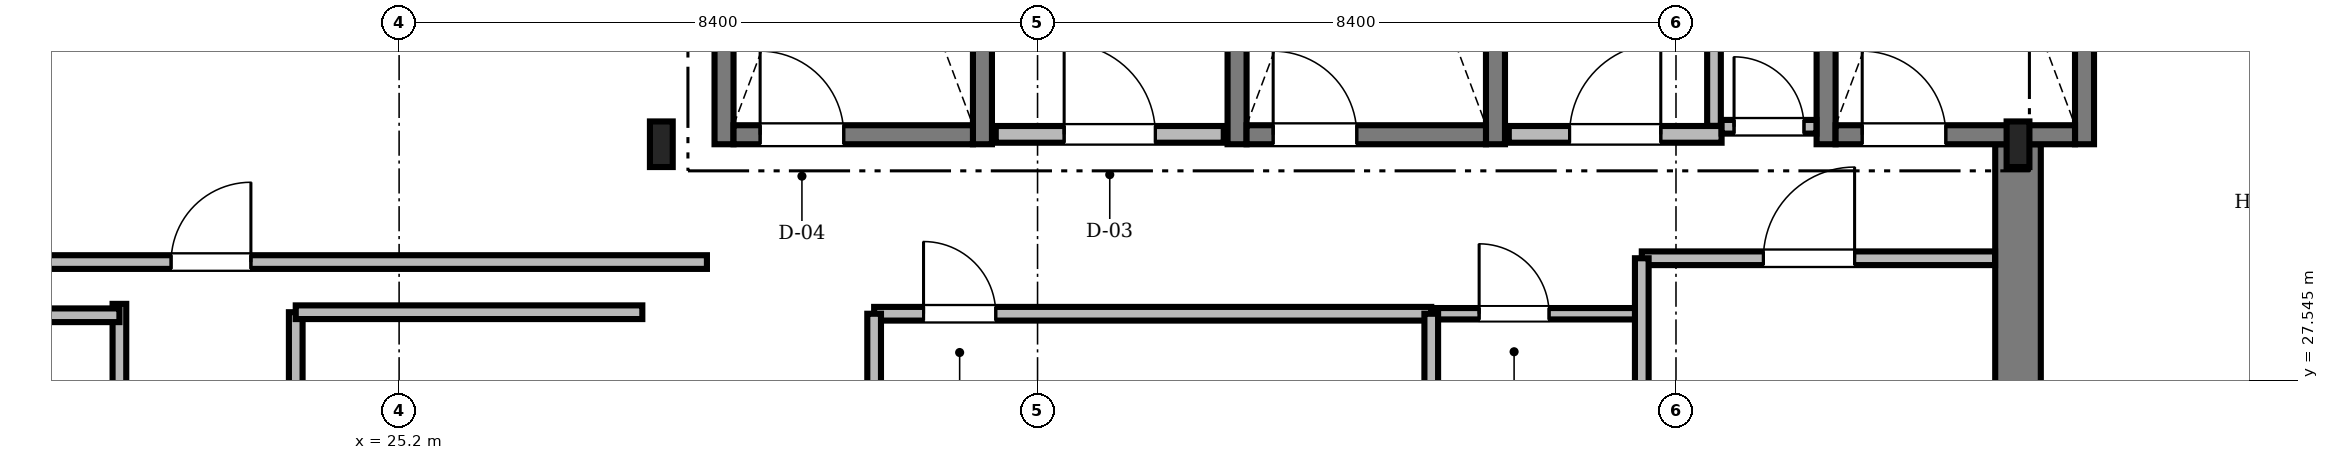
"""IFC4 building model, lengths in metres.
Left out: names, types, materials, properties, quantities, classifications, styles, units other than length and angle.
Written with IfcOpenShell. Run it as: python <this file> out.ifc"""

import sys

from ifc_helpers import new_model, si_unit, direction, frame, frame_2d, origin, origin_2d, place, context, subcontext, project, spatial, rectangle, i_section, extrude, source, transform, mapped, element, fill, save


model = new_model("IFC4")
c1 = context("Model", 3, precision=1e-05, world=origin(), true_north=direction((0.0, 1.0)))
c2 = subcontext(c1, "Body", "Model", "MODEL_VIEW")
j1 = project(units=[si_unit("LENGTHUNIT", "METRE"), si_unit("PLANEANGLEUNIT", "RADIAN")], contexts=[c1])
p1 = place(None, origin())
s1 = spatial("IfcSite", under=j1, at=p1, CompositionType="ELEMENT")
p2 = place(p1, origin())
s2 = spatial("IfcBuilding", under=s1, at=p2, CompositionType="ELEMENT")
p3 = place(p2, frame((0.0, 0.0, 270.35)))
s3 = spatial("IfcBuildingStorey", under=s2, at=p3, CompositionType="ELEMENT", Elevation=270.35)
m1 = source(origin(), c2, "Body", "SweptSolid", [
    extrude(rectangle(XDim=13.15, YDim=0.6, at=frame_2d((6.575, 0.0))), origin(), (0.0, 0.0, 1.0), 3.65),
])
p4 = place(p3, frame((46.5, 17.5, 0.0), z_axis=(0.0, 0.0, 1.0), x_axis=(0.0, 1.0, 0.0)))
e1 = element("IfcWall", 1, at=p4, inside=s3, PredefinedType="SHEAR", context=c2, shape_type="MappedRepresentation", body=[
    mapped(m1, transform((0.0, 0.0, 0.0), scale=1.0)),
])
m2 = source(origin(), c2, "Body", "SweptSolid", [
    extrude(i_section(OverallWidth=0.3, OverallDepth=0.6, WebThickness=0.015, FlangeThickness=0.03, FilletRadius=0.027, at=origin_2d()), origin(), (0.0, 0.0, 1.0), 3.65),
])
for number, where, z_axis, x_axis in (
    (2, (28.65, 30.65, 0.0), (0.0, 0.0, 1.0), (1.0, 0.0, 0.0)),
    (3, (46.5, 30.65, 0.0), (0.0, 0.0, 1.0), (1.0, 0.0, 0.0)),
):
    element("IfcColumn", number, at=place(p3, frame(where, z_axis=z_axis, x_axis=x_axis)), inside=s3, PredefinedType="COLUMN", context=c2, shape_type="MappedRepresentation", body=[
        mapped(m2, transform((0.0, 0.0, 0.0), scale=1.0)),
    ])
m3 = source(origin(), c2, "Body", "SweptSolid", [
    extrude(rectangle(XDim=9.35, YDim=0.25, at=frame_2d((4.675, 0.0))), origin(), (0.0, 0.0, 1.0), 3.75),
])
for number, where, z_axis, x_axis in (
    (4, (29.475, 30.65, 0.0), (0.0, 0.0, 1.0), (0.0, 1.0, 0.0)),
    (5, (32.875, 30.65, 0.0), (0.0, 0.0, 1.0), (0.0, 1.0, 0.0)),
):
    element("IfcWall", number, at=place(p3, frame(where, z_axis=z_axis, x_axis=x_axis)), inside=s3, PredefinedType="SOLIDWALL", context=c2, shape_type="MappedRepresentation", body=[
        mapped(m3, transform((0.0, 0.0, 0.0), scale=1.0)),
    ])
m4 = source(origin(), c2, "Body", "SweptSolid", [
    extrude(rectangle(XDim=3.15, YDim=0.25, at=frame_2d((1.575, 0.0))), origin(), (0.0, 0.0, 1.0), 3.75),
])
p5 = place(p3, frame((29.6, 30.775, 0.0), z_axis=(0.0, 0.0, 1.0), x_axis=(1.0, 0.0, 0.0)))
e6 = element("IfcWall", 6, at=p5, inside=s3, PredefinedType="SOLIDWALL", context=c2, shape_type="MappedRepresentation", body=[
    mapped(m4, transform((0.0, 0.0, 0.0), scale=1.0)),
])
m5 = source(origin(), c2, "Body", "SweptSolid", [
    extrude(rectangle(XDim=1.1, YDim=2.2, at=frame_2d((0.55, 1.1))), frame((0.0, 0.135, 0.0), z_axis=(0.0, -1.0, 0.0), x_axis=(1.0, 0.0, 0.0)), (0.0, 0.0, 1.0), 0.27),
])
p6 = place(p5, frame((0.35, 0.0, 0.0)))
e7 = element("IfcOpeningElement", 7, at=p6, cuts=e6, PredefinedType="OPENING", context=c2, shape_type="MappedRepresentation", body=[
    mapped(m5, transform((0.0, 0.0, 0.0), scale=1.0)),
])
for number, where, z_axis, x_axis in (
    (8, (36.225, 30.65, 0.0), (0.0, 0.0, 1.0), (0.0, 1.0, 0.0)),
    (9, (39.625, 30.65, 0.0), (0.0, 0.0, 1.0), (0.0, 1.0, 0.0)),
):
    element("IfcWall", number, at=place(p3, frame(where, z_axis=z_axis, x_axis=x_axis)), inside=s3, PredefinedType="SOLIDWALL", context=c2, shape_type="MappedRepresentation", body=[
        mapped(m3, transform((0.0, 0.0, 0.0), scale=1.0)),
    ])
p7 = place(p3, frame((36.35, 30.775, 0.0), z_axis=(0.0, 0.0, 1.0), x_axis=(1.0, 0.0, 0.0)))
e10 = element("IfcWall", 10, at=p7, inside=s3, PredefinedType="SOLIDWALL", context=c2, shape_type="MappedRepresentation", body=[
    mapped(m4, transform((0.0, 0.0, 0.0), scale=1.0)),
])
p8 = place(p7, frame((0.35, 0.0, 0.0)))
e11 = element("IfcOpeningElement", 11, at=p8, cuts=e10, PredefinedType="OPENING", context=c2, shape_type="MappedRepresentation", body=[
    mapped(m5, transform((0.0, 0.0, 0.0), scale=1.0)),
])
for number, where, z_axis, x_axis in (
    (12, (43.975, 30.65, 0.0), (0.0, 0.0, 1.0), (0.0, 1.0, 0.0)),
    (13, (47.375, 30.65, 0.0), (0.0, 0.0, 1.0), (0.0, 1.0, 0.0)),
):
    element("IfcWall", number, at=place(p3, frame(where, z_axis=z_axis, x_axis=x_axis)), inside=s3, PredefinedType="SOLIDWALL", context=c2, shape_type="MappedRepresentation", body=[
        mapped(m3, transform((0.0, 0.0, 0.0), scale=1.0)),
    ])
p9 = place(p3, frame((44.1, 30.775, 0.0), z_axis=(0.0, 0.0, 1.0), x_axis=(1.0, 0.0, 0.0)))
e14 = element("IfcWall", 14, at=p9, inside=s3, PredefinedType="SOLIDWALL", context=c2, shape_type="MappedRepresentation", body=[
    mapped(m4, transform((0.0, 0.0, 0.0), scale=1.0)),
])
p10 = place(p9, frame((0.35, 0.0, 0.0)))
e15 = element("IfcOpeningElement", 15, at=p10, cuts=e14, PredefinedType="OPENING", context=c2, shape_type="MappedRepresentation", body=[
    mapped(m5, transform((0.0, 0.0, 0.0), scale=1.0)),
])
m6 = source(origin(), c2, "Body", "SweptSolid", [
    extrude(rectangle(XDim=3.0, YDim=0.22, at=frame_2d((1.5, 0.0))), origin(), (0.0, 0.0, 1.0), 3.65),
])
p11 = place(p3, frame((33.05, 30.78, 0.0), z_axis=(0.0, 0.0, 1.0), x_axis=(1.0, 0.0, 0.0)))
e16 = element("IfcWall", 16, at=p11, inside=s3, PredefinedType="SOLIDWALL", context=c2, shape_type="MappedRepresentation", body=[
    mapped(m6, transform((0.0, 0.0, 0.0), scale=1.0)),
])
m7 = source(origin(), c2, "Body", "SweptSolid", [
    extrude(rectangle(XDim=1.2, YDim=2.2, at=frame_2d((0.6, 1.1))), frame((0.0, 0.12, 0.0), z_axis=(0.0, -1.0, 0.0), x_axis=(1.0, 0.0, 0.0)), (0.0, 0.0, 1.0), 0.24),
])
p12 = place(p11, frame((0.9, 0.0, 0.0)))
e17 = element("IfcOpeningElement", 17, at=p12, cuts=e16, PredefinedType="OPENING", context=c2, shape_type="MappedRepresentation", body=[
    mapped(m7, transform((0.0, 0.0, 0.0), scale=1.0)),
])
m8 = source(origin(), c2, "Body", "SweptSolid", [
    extrude(rectangle(XDim=2.8, YDim=0.22, at=frame_2d((1.4, 0.0))), origin(), (0.0, 0.0, 1.0), 3.65),
])
p13 = place(p3, frame((39.8, 30.78, 0.0), z_axis=(0.0, 0.0, 1.0), x_axis=(1.0, 0.0, 0.0)))
e18 = element("IfcWall", 18, at=p13, inside=s3, PredefinedType="SOLIDWALL", context=c2, shape_type="MappedRepresentation", body=[
    mapped(m8, transform((0.0, 0.0, 0.0), scale=1.0)),
])
p14 = place(p13, frame((0.8, 0.0, 0.0)))
e19 = element("IfcOpeningElement", 19, at=p14, cuts=e18, PredefinedType="OPENING", context=c2, shape_type="MappedRepresentation", body=[
    mapped(m7, transform((0.0, 0.0, 0.0), scale=1.0)),
])
m9 = source(origin(), c2, "Body", "SweptSolid", [
    extrude(rectangle(XDim=14.42, YDim=0.18, at=frame_2d((7.21, 0.0))), origin(), (0.0, 0.0, 1.0), 3.092),
])
p15 = place(p3, frame((21.52, 14.13, 0.0), z_axis=(0.0, 0.0, 1.0), x_axis=(0.0, 1.0, 0.0)))
e20 = element("IfcWall", 20, at=p15, inside=s3, PredefinedType="PARTITIONING", context=c2, shape_type="MappedRepresentation", body=[
    mapped(m9, transform((0.0, 0.0, 0.0), scale=1.0)),
])
m10 = source(origin(), c2, "Body", "SweptSolid", [
    extrude(rectangle(XDim=1.05, YDim=2.2, at=frame_2d((0.525, 1.1))), frame((0.0, 0.1, 0.0), z_axis=(0.0, -1.0, 0.0), x_axis=(1.0, 0.0, 0.0)), (0.0, 0.0, 1.0), 0.2),
])
p16 = place(p15, frame((3.048, 0.0, 0.0)))
e21 = element("IfcOpeningElement", 21, at=p16, cuts=e20, PredefinedType="OPENING", context=c2, shape_type="MappedRepresentation", body=[
    mapped(m10, transform((0.0, 0.0, 0.0), scale=1.0)),
])
p17 = place(p15, frame((10.183, 0.0, 0.0)))
e22 = element("IfcOpeningElement", 22, at=p17, cuts=e20, PredefinedType="OPENING", context=c2, shape_type="MappedRepresentation", body=[
    mapped(m10, transform((0.0, 0.0, 0.0), scale=1.0)),
])
m11 = source(origin(), c2, "Body", "SweptSolid", [
    extrude(rectangle(XDim=11.94, YDim=0.18, at=frame_2d((5.97, 0.0))), origin(), (0.0, 0.0, 1.0), 3.092),
])
p18 = place(p3, frame((23.84, 16.5, 0.0), z_axis=(0.0, 0.0, 1.0), x_axis=(0.0, 1.0, 0.0)))
e23 = element("IfcWall", 23, at=p18, inside=s3, PredefinedType="PARTITIONING", context=c2, shape_type="MappedRepresentation", body=[
    mapped(m11, transform((0.0, 0.0, 0.0), scale=1.0)),
])
p19 = place(p18, frame((4.5, 0.0, 0.0)))
e24 = element("IfcOpeningElement", 24, at=p19, cuts=e23, PredefinedType="OPENING", context=c2, shape_type="MappedRepresentation", body=[
    mapped(m10, transform((0.0, 0.0, 0.0), scale=1.0)),
])
m12 = source(origin(), c2, "Body", "SweptSolid", [
    extrude(rectangle(XDim=11.168, YDim=0.18, at=frame_2d((5.584, 0.0))), origin(), (0.0, 0.0, 1.0), 2.892),
])
p20 = place(p3, frame((18.082, 29.1, 0.0), z_axis=(0.0, 0.0, 1.0), x_axis=(1.0, 0.0, 0.0)))
e25 = element("IfcWall", 25, at=p20, inside=s3, PredefinedType="PARTITIONING", context=c2, shape_type="MappedRepresentation", body=[
    mapped(m12, transform((0.0, 0.0, 0.0), scale=1.0)),
])
p21 = place(p20, frame((4.118, 0.0, 0.0)))
e26 = element("IfcOpeningElement", 26, at=p21, cuts=e25, PredefinedType="OPENING", context=c2, shape_type="MappedRepresentation", body=[
    mapped(m10, transform((0.0, 0.0, 0.0), scale=1.0)),
])
m13 = source(origin(), c2, "Body", "SweptSolid", [
    extrude(rectangle(XDim=7.33, YDim=0.18, at=frame_2d((3.665, 0.0))), origin(), (0.0, 0.0, 1.0), 3.282),
])
p22 = place(p3, frame((31.45, 28.42, 0.0), z_axis=(0.0, 0.0, 1.0), x_axis=(1.0, 0.0, 0.0)))
e27 = element("IfcWall", 27, at=p22, inside=s3, PredefinedType="PARTITIONING", context=c2, shape_type="MappedRepresentation", body=[
    mapped(m13, transform((0.0, 0.0, 0.0), scale=1.0)),
])
m14 = source(origin(), c2, "Body", "SweptSolid", [
    extrude(rectangle(XDim=0.95, YDim=2.15, at=frame_2d((0.475, 1.075))), frame((0.0, 0.1, 0.0), z_axis=(0.0, -1.0, 0.0), x_axis=(1.0, 0.0, 0.0)), (0.0, 0.0, 1.0), 0.2),
])
p23 = place(p22, frame((0.65, 0.0, 0.0)))
e28 = element("IfcOpeningElement", 28, at=p23, cuts=e27, PredefinedType="OPENING", context=c2, shape_type="MappedRepresentation", body=[
    mapped(m14, transform((0.0, 0.0, 0.0), scale=1.0)),
])
m15 = source(origin(), c2, "Body", "SweptSolid", [
    extrude(rectangle(XDim=4.648, YDim=0.18, at=frame_2d((2.324, 0.0))), origin(), (0.0, 0.0, 1.0), 3.282),
])
p24 = place(p3, frame((41.55, 29.15, 0.0), z_axis=(0.0, 0.0, 1.0), x_axis=(1.0, 0.0, 0.0)))
e29 = element("IfcWall", 29, at=p24, inside=s3, PredefinedType="PARTITIONING", context=c2, shape_type="MappedRepresentation", body=[
    mapped(m15, transform((0.0, 0.0, 0.0), scale=1.0)),
])
m16 = source(origin(), c2, "Body", "SweptSolid", [
    extrude(rectangle(XDim=1.2, YDim=2.2, at=frame_2d((0.6, 1.1))), frame((0.0, 0.1, 0.0), z_axis=(0.0, -1.0, 0.0), x_axis=(1.0, 0.0, 0.0)), (0.0, 0.0, 1.0), 0.2),
])
p25 = place(p24, frame((1.6, 0.0, 0.0)))
e30 = element("IfcOpeningElement", 30, at=p25, cuts=e29, PredefinedType="OPENING", context=c2, shape_type="MappedRepresentation", body=[
    mapped(m16, transform((0.0, 0.0, 0.0), scale=1.0)),
])
m17 = source(origin(), c2, "Body", "SweptSolid", [
    extrude(rectangle(XDim=2.74, YDim=0.15, at=frame_2d((1.37, 0.0))), origin(), (0.0, 0.0, 1.0), 3.65),
])
p26 = place(p3, frame((38.78, 28.42, 0.0), z_axis=(0.0, 0.0, 1.0), x_axis=(1.0, 0.0, 0.0)))
e31 = element("IfcWall", 31, at=p26, inside=s3, PredefinedType="PARTITIONING", context=c2, shape_type="MappedRepresentation", body=[
    mapped(m17, transform((0.0, 0.0, 0.0), scale=1.0)),
])
m18 = source(origin(), c2, "Body", "SweptSolid", [
    extrude(rectangle(XDim=0.92, YDim=2.1, at=frame_2d((0.46, 1.05))), frame((0.0, 0.085, 0.0), z_axis=(0.0, -1.0, 0.0), x_axis=(1.0, 0.0, 0.0)), (0.0, 0.0, 1.0), 0.17),
])
p27 = place(p26, frame((0.63, 0.0, 0.0)))
e32 = element("IfcOpeningElement", 32, at=p27, cuts=e31, PredefinedType="OPENING", context=c2, shape_type="MappedRepresentation", body=[
    mapped(m18, transform((0.0, 0.0, 0.0), scale=1.0)),
])
m19 = source(origin(), c2, "Body", "SweptSolid", [
    extrude(rectangle(XDim=1.248, YDim=0.18, at=frame_2d((0.624, 0.0))), origin(), (0.0, 0.0, 1.0), 3.65),
])
p28 = place(p3, frame((42.6, 30.88, 0.0), z_axis=(0.0, 0.0, 1.0), x_axis=(1.0, 0.0, 0.0)))
e33 = element("IfcWall", 33, at=p28, inside=s3, PredefinedType="PARTITIONING", context=c2, shape_type="MappedRepresentation", body=[
    mapped(m19, transform((0.0, 0.0, 0.0), scale=1.0)),
])
m20 = source(origin(), c2, "Body", "SweptSolid", [
    extrude(rectangle(XDim=0.92, YDim=2.1, at=frame_2d((0.46, 1.05))), frame((0.0, 0.1, 0.0), z_axis=(0.0, -1.0, 0.0), x_axis=(1.0, 0.0, 0.0)), (0.0, 0.0, 1.0), 0.2),
])
p29 = place(p28, frame((0.164, 0.0, 0.0)))
e34 = element("IfcOpeningElement", 34, at=p29, cuts=e33, PredefinedType="OPENING", context=c2, shape_type="MappedRepresentation", body=[
    mapped(m20, transform((0.0, 0.0, 0.0), scale=1.0)),
])
m21 = source(origin(), c2, "Body", "SweptSolid", [
    extrude(rectangle(XDim=4.56, YDim=0.18, at=frame_2d((2.28, 0.0))), origin(), (0.0, 0.0, 1.0), 3.65),
])
p30 = place(p3, frame((23.84, 28.44, 0.0), z_axis=(0.0, 0.0, 1.0), x_axis=(1.0, 0.0, 0.0)))
e35 = element("IfcWall", 35, at=p30, inside=s3, PredefinedType="PARTITIONING", context=c2, shape_type="MappedRepresentation", body=[
    mapped(m21, transform((0.0, 0.0, 0.0), scale=1.0)),
])
m22 = source(origin(), c2, "Body", "SweptSolid", [
    extrude(rectangle(XDim=3.63, YDim=0.18, at=frame_2d((1.815, 0.0))), origin(), (0.0, 0.0, 1.0), 2.892),
])
p31 = place(p3, frame((17.89, 28.4, 0.0), z_axis=(0.0, 0.0, 1.0), x_axis=(1.0, 0.0, 0.0)))
e36 = element("IfcWall", 36, at=p31, inside=s3, PredefinedType="PARTITIONING", context=c2, shape_type="MappedRepresentation", body=[
    mapped(m22, transform((0.0, 0.0, 0.0), scale=1.0)),
])
m23 = source(origin(), c2, "Body", "SweptSolid", [
    extrude(rectangle(XDim=2.758, YDim=0.18, at=frame_2d((1.379, 0.0))), origin(), (0.0, 0.0, 1.0), 3.65),
])
p32 = place(p3, frame((42.5, 30.892, 0.0), z_axis=(0.0, 0.0, 1.0), x_axis=(0.0, 1.0, 0.0)))
e37 = element("IfcWall", 37, at=p32, inside=s3, PredefinedType="PARTITIONING", context=c2, shape_type="MappedRepresentation", body=[
    mapped(m23, transform((0.0, 0.0, 0.0), scale=1.0)),
])
m24 = source(origin(), c2, "Body", "SweptSolid", [
    extrude(rectangle(XDim=2.35, YDim=0.18, at=frame_2d((1.175, 0.0))), origin(), (0.0, 0.0, 1.0), 3.282),
])
p33 = place(p3, frame((41.55, 26.8, 0.0), z_axis=(0.0, 0.0, 1.0), x_axis=(0.0, 1.0, 0.0)))
e38 = element("IfcWall", 38, at=p33, inside=s3, PredefinedType="PARTITIONING", context=c2, shape_type="MappedRepresentation", body=[
    mapped(m24, transform((0.0, 0.0, 0.0), scale=1.0)),
])
m25 = source(origin(), c2, "Body", "SweptSolid", [
    extrude(rectangle(XDim=1.6, YDim=0.18, at=frame_2d((0.8, 0.0))), origin(), (0.0, 0.0, 1.0), 3.192),
])
for number, where, z_axis, x_axis in (
    (39, (31.45, 26.82, 0.0), (0.0, 0.0, 1.0), (0.0, 1.0, 0.0)),
    (40, (38.78, 26.82, 0.0), (0.0, 0.0, 1.0), (0.0, 1.0, 0.0)),
):
    element("IfcWall", number, at=place(p3, frame(where, z_axis=z_axis, x_axis=x_axis)), inside=s3, PredefinedType="PARTITIONING", context=c2, shape_type="MappedRepresentation", body=[
        mapped(m25, transform((0.0, 0.0, 0.0), scale=1.0)),
    ])
m26 = source(origin(), c2, "Body", "SweptSolid", [
    extrude(rectangle(XDim=1.1, YDim=2.2, at=frame_2d((0.55, 1.1))), frame((0.0, 0.025, 0.0), z_axis=(0.0, -1.0, 0.0), x_axis=(1.0, 0.0, 0.0)), (0.0, 0.0, 1.0), 0.05),
])
p34 = place(p6, origin())
e41 = element("IfcDoor", 41, at=p34, inside=s3, OperationType="SINGLE_SWING_LEFT", PredefinedType="DOOR", context=c2, shape_type="MappedRepresentation", body=[
    mapped(m26, transform((0.0, 0.0, 0.0), scale=1.0)),
])
fill(e7, e41)
p35 = place(p8, origin())
e42 = element("IfcDoor", 42, at=p35, inside=s3, OperationType="SINGLE_SWING_LEFT", PredefinedType="DOOR", context=c2, shape_type="MappedRepresentation", body=[
    mapped(m26, transform((0.0, 0.0, 0.0), scale=1.0)),
])
fill(e11, e42)
p36 = place(p10, origin())
e43 = element("IfcDoor", 43, at=p36, inside=s3, OperationType="SINGLE_SWING_LEFT", PredefinedType="DOOR", context=c2, shape_type="MappedRepresentation", body=[
    mapped(m26, transform((0.0, 0.0, 0.0), scale=1.0)),
])
fill(e15, e43)
m27 = source(origin(), c2, "Body", "SweptSolid", [
    extrude(rectangle(XDim=1.2, YDim=2.2, at=frame_2d((0.6, 1.1))), frame((0.0, 0.025, 0.0), z_axis=(0.0, -1.0, 0.0), x_axis=(1.0, 0.0, 0.0)), (0.0, 0.0, 1.0), 0.05),
])
p37 = place(p12, origin())
e44 = element("IfcDoor", 44, at=p37, inside=s3, OperationType="SINGLE_SWING_LEFT", PredefinedType="DOOR", context=c2, shape_type="MappedRepresentation", body=[
    mapped(m27, transform((0.0, 0.0, 0.0), scale=1.0)),
])
fill(e17, e44)
p38 = place(p14, origin())
e45 = element("IfcDoor", 45, at=p38, inside=s3, OperationType="SINGLE_SWING_RIGHT", PredefinedType="DOOR", context=c2, shape_type="MappedRepresentation", body=[
    mapped(m27, transform((0.0, 0.0, 0.0), scale=1.0)),
])
fill(e19, e45)
m28 = source(origin(), c2, "Body", "SweptSolid", [
    extrude(rectangle(XDim=1.05, YDim=2.2, at=frame_2d((0.525, 1.1))), frame((0.0, 0.025, 0.0), z_axis=(0.0, -1.0, 0.0), x_axis=(1.0, 0.0, 0.0)), (0.0, 0.0, 1.0), 0.05),
])
p39 = place(p21, origin())
e46 = element("IfcDoor", 46, at=p39, inside=s3, OperationType="SINGLE_SWING_RIGHT", PredefinedType="DOOR", context=c2, shape_type="MappedRepresentation", body=[
    mapped(m28, transform((0.0, 0.0, 0.0), scale=1.0)),
])
fill(e26, e46)
m29 = source(origin(), c2, "Body", "SweptSolid", [
    extrude(rectangle(XDim=0.95, YDim=2.15, at=frame_2d((0.475, 1.075))), frame((0.0, 0.025, 0.0), z_axis=(0.0, -1.0, 0.0), x_axis=(1.0, 0.0, 0.0)), (0.0, 0.0, 1.0), 0.05),
])
p40 = place(p23, origin())
e47 = element("IfcDoor", 47, at=p40, inside=s3, OperationType="SINGLE_SWING_LEFT", PredefinedType="DOOR", context=c2, shape_type="MappedRepresentation", body=[
    mapped(m29, transform((0.0, 0.0, 0.0), scale=1.0)),
])
fill(e28, e47)
p41 = place(p25, origin())
e48 = element("IfcDoor", 48, at=p41, inside=s3, OperationType="SINGLE_SWING_RIGHT", PredefinedType="DOOR", context=c2, shape_type="MappedRepresentation", body=[
    mapped(m27, transform((0.0, 0.0, 0.0), scale=1.0)),
])
fill(e30, e48)
m30 = source(origin(), c2, "Body", "SweptSolid", [
    extrude(rectangle(XDim=0.92, YDim=2.1, at=frame_2d((0.46, 1.05))), frame((0.0, 0.025, 0.0), z_axis=(0.0, -1.0, 0.0), x_axis=(1.0, 0.0, 0.0)), (0.0, 0.0, 1.0), 0.05),
])
p42 = place(p27, origin())
e49 = element("IfcDoor", 49, at=p42, inside=s3, OperationType="SINGLE_SWING_LEFT", PredefinedType="DOOR", context=c2, shape_type="MappedRepresentation", body=[
    mapped(m30, transform((0.0, 0.0, 0.0), scale=1.0)),
])
fill(e32, e49)
p43 = place(p29, origin())
e50 = element("IfcDoor", 50, at=p43, inside=s3, OperationType="SINGLE_SWING_LEFT", PredefinedType="DOOR", context=c2, shape_type="MappedRepresentation", body=[
    mapped(m30, transform((0.0, 0.0, 0.0), scale=1.0)),
])
fill(e34, e50)
save(model, sys.argv[1])
